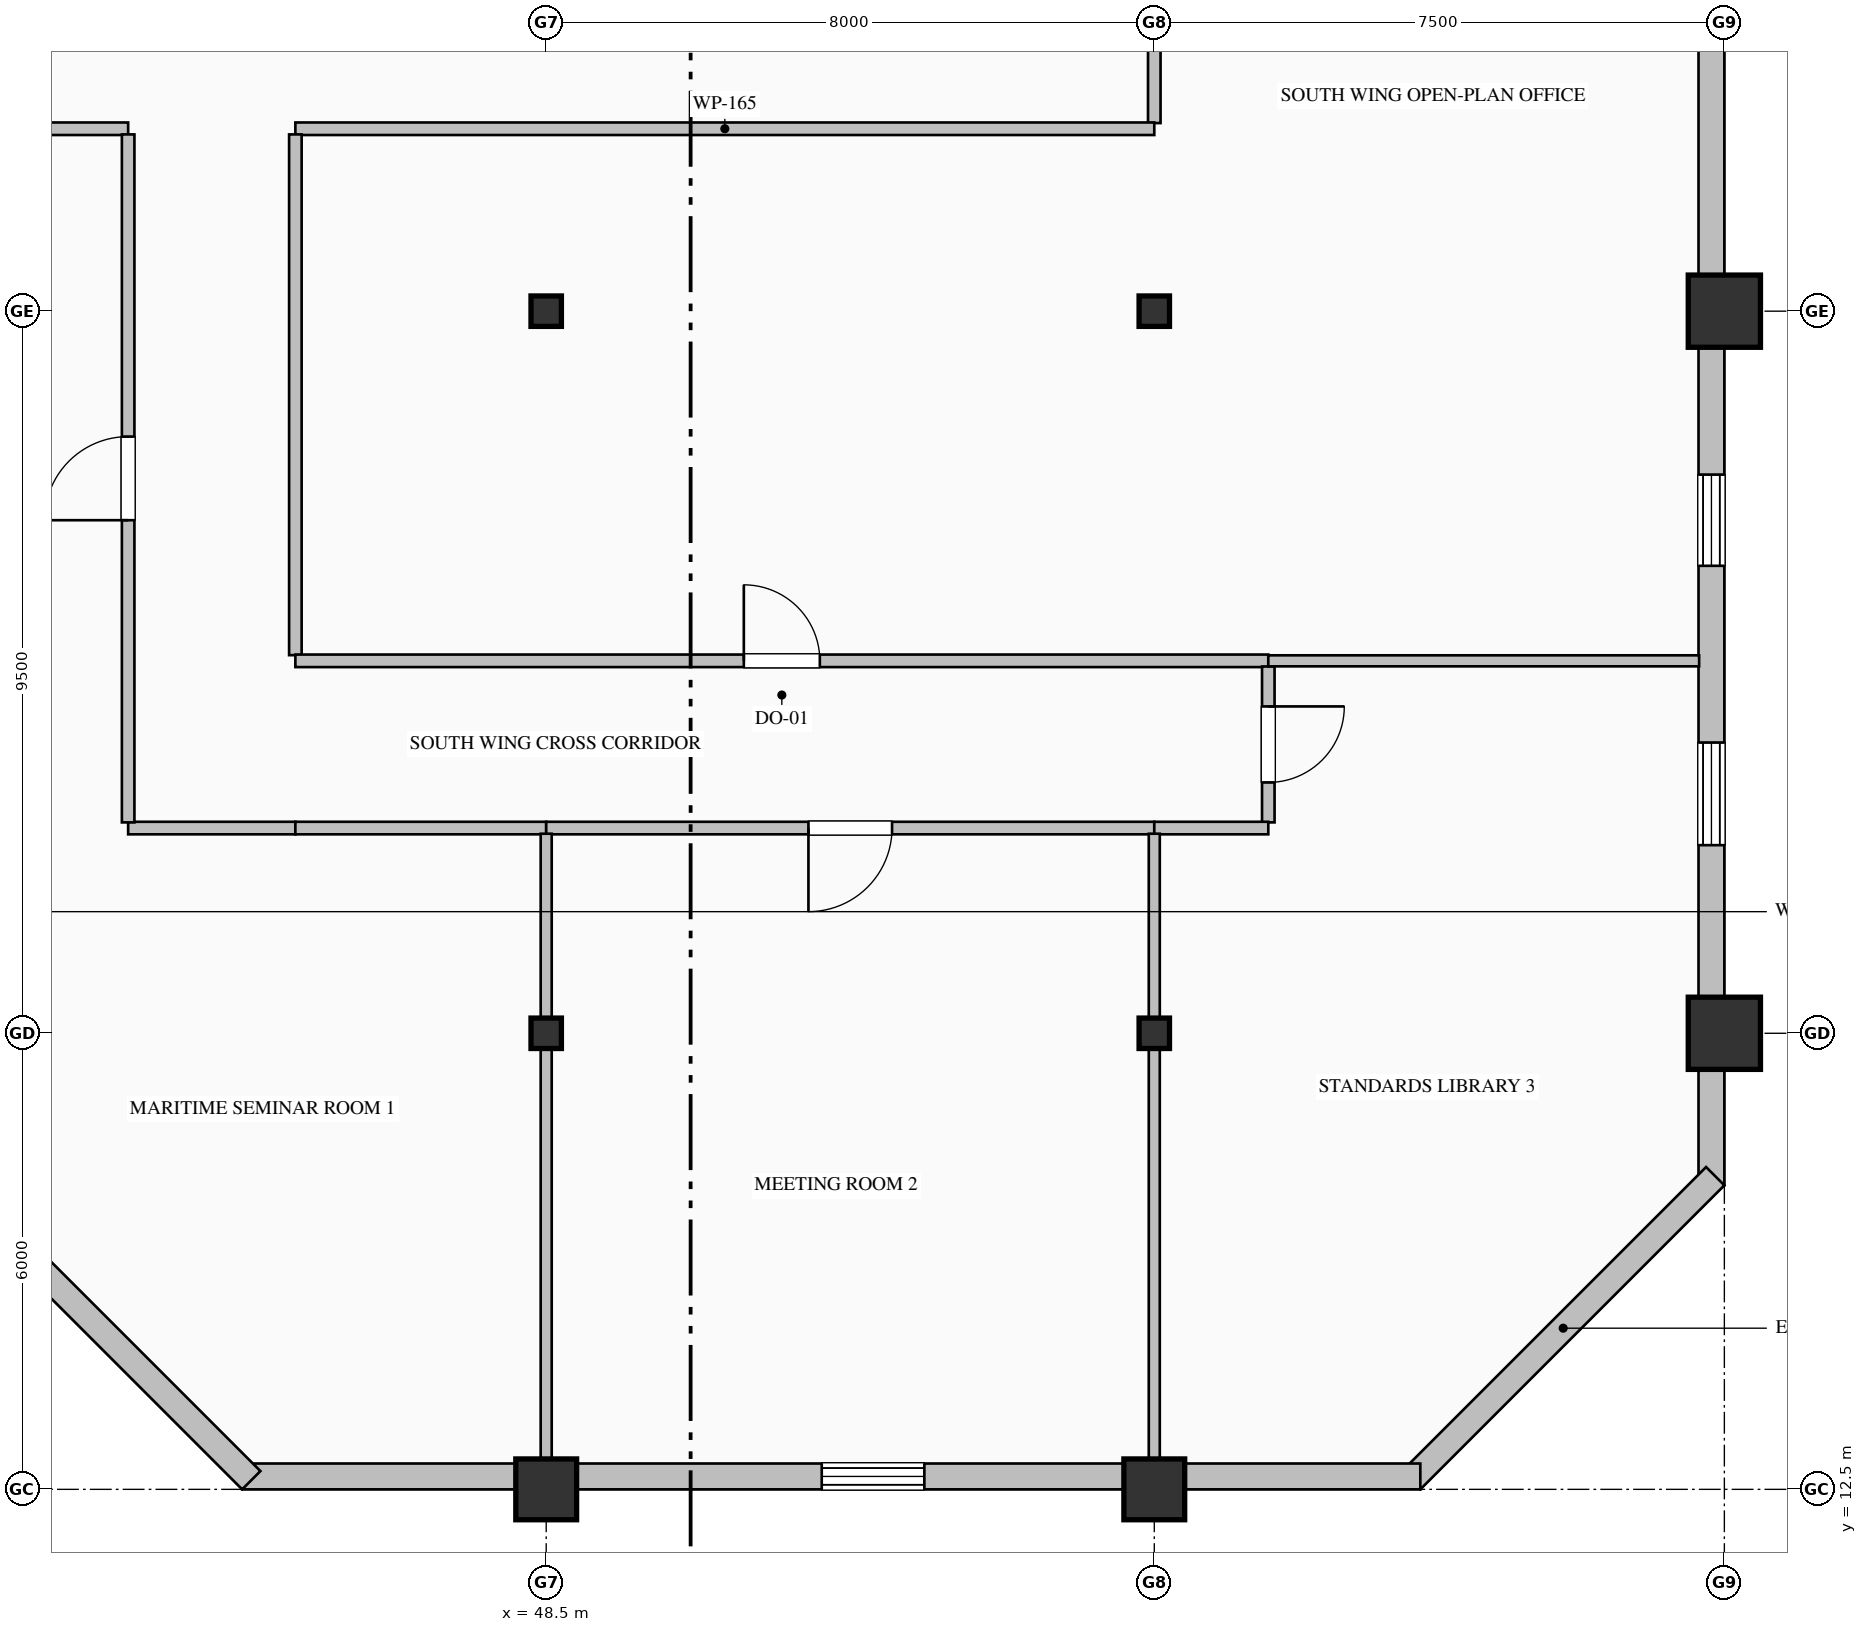
"""IFC4 building model, lengths in metres.
Left out: names, types, materials, properties, quantities, classifications, styles, units other than length and angle.
Written with IfcOpenShell. Run it as: python <this file> out.ifc"""

import sys

from ifc_helpers import new_model, si_unit, direction, frame, frame_2d, origin, origin_2d, place, context, subcontext, project, spatial, rectangle, hollow_rectangle, i_section, extrude, element, fill, save


model = new_model("IFC4")
c1 = context("Model", 3, precision=1e-05, world=origin(), true_north=direction((0.0, 1.0)))
c2 = subcontext(c1, "Body", "Model", "MODEL_VIEW")
j1 = project(units=[si_unit("LENGTHUNIT", "METRE"), si_unit("PLANEANGLEUNIT", "RADIAN")], contexts=[c1])
p1 = place(None, origin())
s1 = spatial("IfcSite", under=j1, at=p1, CompositionType="ELEMENT")
p2 = place(p1, origin())
s2 = spatial("IfcBuilding", under=s1, at=p2, CompositionType="ELEMENT")
p3 = place(p2, frame((0.0, 0.0, 217.8)))
s3 = spatial("IfcBuildingStorey", under=s2, at=p3, CompositionType="ELEMENT", Elevation=217.8)
p4 = place(p3, frame((48.5, 12.5, 0.0), z_axis=(0.0, 0.0, 1.0), x_axis=(1.0, 0.0, 0.0)))
e1 = element("IfcColumn", 1, at=p4, inside=s3, PredefinedType="COLUMN", context=c2, shape_type="SweptSolid", body=[
    extrude(hollow_rectangle(XDim=0.8, YDim=0.8, WallThickness=0.032, at=origin_2d()), origin(), (0.0, 0.0, 1.0), 4.0),
])
for number, where, z_axis, x_axis in (
    (2, (48.5, 18.5, 0.0), (0.0, 0.0, 1.0), (1.0, 0.0, 0.0)),
    (3, (48.5, 28.0, 0.0), (0.0, 0.0, 1.0), (1.0, 0.0, 0.0)),
):
    element("IfcColumn", number, at=place(p3, frame(where, z_axis=z_axis, x_axis=x_axis)), inside=s3, PredefinedType="COLUMN", context=c2, shape_type="SweptSolid", body=[
        extrude(i_section(OverallWidth=0.4, OverallDepth=0.4, WebThickness=0.013, FlangeThickness=0.021, FilletRadius=0.022, at=origin_2d()), origin(), (0.0, 0.0, 1.0), 4.0),
    ])
p5 = place(p3, frame((56.5, 12.5, 0.0), z_axis=(0.0, 0.0, 1.0), x_axis=(1.0, 0.0, 0.0)))
e4 = element("IfcColumn", 4, at=p5, inside=s3, PredefinedType="COLUMN", context=c2, shape_type="SweptSolid", body=[
    extrude(hollow_rectangle(XDim=0.8, YDim=0.8, WallThickness=0.032, at=origin_2d()), origin(), (0.0, 0.0, 1.0), 4.0),
])
for number, where, z_axis, x_axis in (
    (5, (56.5, 18.5, 0.0), (0.0, 0.0, 1.0), (1.0, 0.0, 0.0)),
    (6, (56.5, 28.0, 0.0), (0.0, 0.0, 1.0), (1.0, 0.0, 0.0)),
):
    element("IfcColumn", number, at=place(p3, frame(where, z_axis=z_axis, x_axis=x_axis)), inside=s3, PredefinedType="COLUMN", context=c2, shape_type="SweptSolid", body=[
        extrude(i_section(OverallWidth=0.4, OverallDepth=0.4, WebThickness=0.013, FlangeThickness=0.021, FilletRadius=0.022, at=origin_2d()), origin(), (0.0, 0.0, 1.0), 4.0),
    ])
for number, where, z_axis, x_axis in (
    (7, (64.0, 18.5, 0.0), (0.0, 0.0, 1.0), (1.0, 0.0, 0.0)),
    (8, (64.0, 28.0, 0.0), (0.0, 0.0, 1.0), (1.0, 0.0, 0.0)),
):
    element("IfcColumn", number, at=place(p3, frame(where, z_axis=z_axis, x_axis=x_axis)), inside=s3, PredefinedType="COLUMN", context=c2, shape_type="SweptSolid", body=[
        extrude(hollow_rectangle(XDim=0.95, YDim=0.95, WallThickness=0.036, at=origin_2d()), origin(), (0.0, 0.0, 1.0), 4.0),
    ])
p6 = place(p3, frame((63.83, 36.05, 0.0), z_axis=(0.0, 0.0, 1.0), x_axis=(0.0, -1.0, 0.0)))
e9 = element("IfcWall", 9, at=p6, inside=s3, PredefinedType="SOLIDWALL", context=c2, shape_type="SweptSolid", body=[
    extrude(rectangle(XDim=19.55, YDim=0.34, at=frame_2d((9.775, 0.0))), origin(), (0.0, 0.0, 1.0), 3.325),
])
p7 = place(p6, frame((2.925, 0.0, 0.9)))
e10 = element("IfcOpeningElement", 10, at=p7, cuts=e9, PredefinedType="OPENING", context=c2, shape_type="SweptSolid", body=[
    extrude(rectangle(XDim=1.35, YDim=1.85, at=frame_2d((0.675, 0.925))), frame((0.0, 0.18, 0.0), z_axis=(0.0, -1.0, 0.0), x_axis=(1.0, 0.0, 0.0)), (0.0, 0.0, 1.0), 0.36),
])
p8 = place(p6, frame((10.2, 0.0, 0.9)))
e11 = element("IfcOpeningElement", 11, at=p8, cuts=e9, PredefinedType="OPENING", context=c2, shape_type="SweptSolid", body=[
    extrude(rectangle(XDim=1.2, YDim=1.85, at=frame_2d((0.6, 0.925))), frame((0.0, 0.18, 0.0), z_axis=(0.0, -1.0, 0.0), x_axis=(1.0, 0.0, 0.0)), (0.0, 0.0, 1.0), 0.36),
])
p9 = place(p6, frame((13.725, 0.0, 0.9)))
e12 = element("IfcOpeningElement", 12, at=p9, cuts=e9, PredefinedType="OPENING", context=c2, shape_type="SweptSolid", body=[
    extrude(rectangle(XDim=1.35, YDim=1.85, at=frame_2d((0.675, 0.925))), frame((0.0, 0.18, 0.0), z_axis=(0.0, -1.0, 0.0), x_axis=(1.0, 0.0, 0.0)), (0.0, 0.0, 1.0), 0.36),
])
p10 = place(p3, frame((63.88, 16.62, 0.0), z_axis=(0.0, 0.0, 1.0), x_axis=(-0.707106781187, -0.707106781187, 0.0)))
e13 = element("IfcWall", 13, at=p10, inside=s3, PredefinedType="SOLIDWALL", context=c2, shape_type="SweptSolid", body=[
    extrude(rectangle(XDim=5.657, YDim=0.34, at=frame_2d((2.828, 0.0))), origin(), (0.0, 0.0, 1.0), 3.775),
])
p11 = place(p3, frame((60.0, 12.67, 0.0), z_axis=(0.0, 0.0, 1.0), x_axis=(-1.0, 0.0, 0.0)))
e14 = element("IfcWall", 14, at=p11, inside=s3, PredefinedType="SOLIDWALL", context=c2, shape_type="SweptSolid", body=[
    extrude(rectangle(XDim=15.5, YDim=0.34, at=frame_2d((7.75, 0.0))), origin(), (0.0, 0.0, 1.0), 3.325),
])
p12 = place(p11, frame((6.525, 0.0, 0.9)))
e15 = element("IfcOpeningElement", 15, at=p12, cuts=e14, PredefinedType="OPENING", context=c2, shape_type="SweptSolid", body=[
    extrude(rectangle(XDim=1.35, YDim=1.85, at=frame_2d((0.675, 0.925))), frame((0.0, 0.18, 0.0), z_axis=(0.0, -1.0, 0.0), x_axis=(1.0, 0.0, 0.0)), (0.0, 0.0, 1.0), 0.36),
])
p13 = place(p3, frame((44.62, 12.62, 0.0), z_axis=(0.0, 0.0, 1.0), x_axis=(-0.707106781187, 0.707106781187, 0.0)))
e16 = element("IfcWall", 16, at=p13, inside=s3, PredefinedType="SOLIDWALL", context=c2, shape_type="SweptSolid", body=[
    extrude(rectangle(XDim=5.657, YDim=0.34, at=frame_2d((2.828, 0.0))), origin(), (0.0, 0.0, 1.0), 3.775),
])
p14 = place(p3, frame((56.5, 36.0, 0.0), z_axis=(0.0, 0.0, 1.0), x_axis=(0.0, -1.0, 0.0)))
e17 = element("IfcWall", 17, at=p14, inside=s3, PredefinedType="PARTITIONING", context=c2, shape_type="SweptSolid", body=[
    extrude(rectangle(XDim=5.525, YDim=0.165, at=frame_2d((2.763, 0.0))), origin(), (0.0, 0.0, 1.0), 3.179),
])
p15 = place(p3, frame((56.5, 30.4, 0.0), z_axis=(0.0, 0.0, 1.0), x_axis=(-1.0, 0.0, 0.0)))
e18 = element("IfcWall", 18, at=p15, inside=s3, PredefinedType="PARTITIONING", context=c2, shape_type="SweptSolid", body=[
    extrude(rectangle(XDim=11.3, YDim=0.165, at=frame_2d((5.65, 0.0))), origin(), (0.0, 0.0, 1.0), 3.775),
])
p16 = place(p3, frame((43.0, 30.4, 0.0), z_axis=(0.0, 0.0, 1.0), x_axis=(-1.0, 0.0, 0.0)))
e19 = element("IfcWall", 19, at=p16, inside=s3, PredefinedType="PARTITIONING", context=c2, shape_type="SweptSolid", body=[
    extrude(rectangle(XDim=2.5, YDim=0.165, at=frame_2d((1.25, 0.0))), origin(), (0.0, 0.0, 1.0), 3.775),
])
p17 = place(p3, frame((45.2, 30.325, 0.0), z_axis=(0.0, 0.0, 1.0), x_axis=(0.0, -1.0, 0.0)))
e20 = element("IfcWall", 20, at=p17, inside=s3, PredefinedType="PARTITIONING", context=c2, shape_type="SweptSolid", body=[
    extrude(rectangle(XDim=6.851, YDim=0.165, at=frame_2d((3.425, 0.0))), origin(), (0.0, 0.0, 1.0), 3.775),
])
p18 = place(p3, frame((45.2, 21.2, 0.0), z_axis=(0.0, 0.0, 1.0), x_axis=(-1.0, 0.0, 0.0)))
e21 = element("IfcWall", 21, at=p18, inside=s3, PredefinedType="PARTITIONING", context=c2, shape_type="SweptSolid", body=[
    extrude(rectangle(XDim=2.2, YDim=0.165, at=frame_2d((1.1, 0.0))), origin(), (0.0, 0.0, 1.0), 3.775),
])
p19 = place(p3, frame((43.0, 21.274, 0.0), z_axis=(0.0, 0.0, 1.0), x_axis=(0.0, 1.0, 0.0)))
e22 = element("IfcWall", 22, at=p19, inside=s3, PredefinedType="PARTITIONING", context=c2, shape_type="SweptSolid", body=[
    extrude(rectangle(XDim=9.051, YDim=0.165, at=frame_2d((4.525, 0.0))), origin(), (0.0, 0.0, 1.0), 3.775),
])
p20 = place(p19, frame((3.976, 0.0, 0.0)))
e23 = element("IfcOpeningElement", 23, at=p20, cuts=e22, PredefinedType="OPENING", context=c2, shape_type="SweptSolid", body=[
    extrude(rectangle(XDim=1.1, YDim=2.2, at=frame_2d((0.55, 1.1))), frame((0.0, 0.093, 0.0), z_axis=(0.0, -1.0, 0.0), x_axis=(1.0, 0.0, 0.0)), (0.0, 0.0, 1.0), 0.185),
])
p21 = place(p3, frame((45.2, 23.4, 0.0), z_axis=(0.0, 0.0, 1.0), x_axis=(1.0, 0.0, 0.0)))
e24 = element("IfcWall", 24, at=p21, inside=s3, PredefinedType="PARTITIONING", context=c2, shape_type="SweptSolid", body=[
    extrude(rectangle(XDim=12.8, YDim=0.165, at=frame_2d((6.4, 0.0))), origin(), (0.0, 0.0, 1.0), 3.467),
])
p22 = place(p21, frame((5.9, 0.0, 0.0)))
e25 = element("IfcOpeningElement", 25, at=p22, cuts=e24, PredefinedType="OPENING", context=c2, shape_type="SweptSolid", body=[
    extrude(rectangle(XDim=1.0, YDim=2.15, at=frame_2d((0.5, 1.075))), frame((0.0, 0.093, 0.0), z_axis=(0.0, -1.0, 0.0), x_axis=(1.0, 0.0, 0.0)), (0.0, 0.0, 1.0), 0.185),
])
p23 = place(p3, frame((48.5, 21.2, 0.0), z_axis=(0.0, 0.0, 1.0), x_axis=(-1.0, 0.0, 0.0)))
e26 = element("IfcWall", 26, at=p23, inside=s3, PredefinedType="PARTITIONING", context=c2, shape_type="SweptSolid", body=[
    extrude(rectangle(XDim=3.3, YDim=0.165, at=frame_2d((1.65, 0.0))), origin(), (0.0, 0.0, 1.0), 3.775),
])
p24 = place(p3, frame((56.5, 21.2, 0.0), z_axis=(0.0, 0.0, 1.0), x_axis=(-1.0, 0.0, 0.0)))
e27 = element("IfcWall", 27, at=p24, inside=s3, PredefinedType="PARTITIONING", context=c2, shape_type="SweptSolid", body=[
    extrude(rectangle(XDim=8.0, YDim=0.165, at=frame_2d((4.0, 0.0))), origin(), (0.0, 0.0, 1.0), 3.775),
])
p25 = place(p24, frame((3.45, 0.0, 0.0)))
e28 = element("IfcOpeningElement", 28, at=p25, cuts=e27, PredefinedType="OPENING", context=c2, shape_type="SweptSolid", body=[
    extrude(rectangle(XDim=1.1, YDim=2.2, at=frame_2d((0.55, 1.1))), frame((0.0, 0.093, 0.0), z_axis=(0.0, -1.0, 0.0), x_axis=(1.0, 0.0, 0.0)), (0.0, 0.0, 1.0), 0.185),
])
p26 = place(p3, frame((58.0, 23.325, 0.0), z_axis=(0.0, 0.0, 1.0), x_axis=(0.0, -1.0, 0.0)))
e29 = element("IfcWall", 29, at=p26, inside=s3, PredefinedType="PARTITIONING", context=c2, shape_type="SweptSolid", body=[
    extrude(rectangle(XDim=2.051, YDim=0.165, at=frame_2d((1.025, 0.0))), origin(), (0.0, 0.0, 1.0), 3.775),
])
p27 = place(p26, frame((0.525, 0.0, 0.0)))
e30 = element("IfcOpeningElement", 30, at=p27, cuts=e29, PredefinedType="OPENING", context=c2, shape_type="SweptSolid", body=[
    extrude(rectangle(XDim=1.0, YDim=2.15, at=frame_2d((0.5, 1.075))), frame((0.0, 0.093, 0.0), z_axis=(0.0, -1.0, 0.0), x_axis=(1.0, 0.0, 0.0)), (0.0, 0.0, 1.0), 0.185),
])
p28 = place(p3, frame((58.0, 21.2, 0.0), z_axis=(0.0, 0.0, 1.0), x_axis=(-1.0, 0.0, 0.0)))
e31 = element("IfcWall", 31, at=p28, inside=s3, PredefinedType="PARTITIONING", context=c2, shape_type="SweptSolid", body=[
    extrude(rectangle(XDim=1.5, YDim=0.165, at=frame_2d((0.75, 0.0))), origin(), (0.0, 0.0, 1.0), 3.775),
])
p29 = place(p3, frame((63.668, 23.4, 0.0), z_axis=(0.0, 0.0, 1.0), x_axis=(-1.0, 0.0, 0.0)))
e32 = element("IfcWall", 32, at=p29, inside=s3, PredefinedType="PARTITIONING", context=c2, shape_type="SweptSolid", body=[
    extrude(rectangle(XDim=5.668, YDim=0.145, at=frame_2d((2.834, 0.0))), origin(), (0.0, 0.0, 1.0), 3.775),
])
for number, where, z_axis, x_axis in (
    (33, (48.5, 21.125, 0.0), (0.0, 0.0, 1.0), (0.0, -1.0, 0.0)),
    (34, (56.5, 21.125, 0.0), (0.0, 0.0, 1.0), (0.0, -1.0, 0.0)),
):
    element("IfcWall", number, at=place(p3, frame(where, z_axis=z_axis, x_axis=x_axis)), inside=s3, PredefinedType="PARTITIONING", context=c2, shape_type="SweptSolid", body=[
        extrude(rectangle(XDim=8.293, YDim=0.145, at=frame_2d((4.147, 0.0))), origin(), (0.0, 0.0, 1.0), 2.967),
    ])
p30 = place(p8, origin())
e35 = element("IfcWindow", 35, at=p30, inside=s3, PartitioningType="DOUBLE_PANEL_VERTICAL", PredefinedType="WINDOW", context=c2, shape_type="SweptSolid", body=[
    extrude(rectangle(XDim=1.2, YDim=1.85, at=frame_2d((0.6, 0.925))), frame((0.0, 0.15, 0.0), z_axis=(0.0, -1.0, 0.0), x_axis=(1.0, 0.0, 0.0)), (0.0, 0.0, 1.0), 0.06),
])
fill(e11, e35)
p31 = place(p9, origin())
e36 = element("IfcWindow", 36, at=p31, inside=s3, PartitioningType="DOUBLE_PANEL_VERTICAL", PredefinedType="WINDOW", context=c2, shape_type="SweptSolid", body=[
    extrude(rectangle(XDim=1.35, YDim=1.85, at=frame_2d((0.675, 0.925))), frame((0.0, 0.15, 0.0), z_axis=(0.0, -1.0, 0.0), x_axis=(1.0, 0.0, 0.0)), (0.0, 0.0, 1.0), 0.06),
])
fill(e12, e36)
p32 = place(p12, origin())
e37 = element("IfcWindow", 37, at=p32, inside=s3, PartitioningType="DOUBLE_PANEL_VERTICAL", PredefinedType="WINDOW", context=c2, shape_type="SweptSolid", body=[
    extrude(rectangle(XDim=1.35, YDim=1.85, at=frame_2d((0.675, 0.925))), frame((0.0, 0.15, 0.0), z_axis=(0.0, -1.0, 0.0), x_axis=(1.0, 0.0, 0.0)), (0.0, 0.0, 1.0), 0.06),
])
fill(e15, e37)
p33 = place(p22, origin())
e38 = element("IfcDoor", 38, at=p33, inside=s3, OperationType="SINGLE_SWING_LEFT", PredefinedType="DOOR", context=c2, shape_type="SweptSolid", body=[
    extrude(rectangle(XDim=1.0, YDim=2.15, at=frame_2d((0.5, 1.075))), frame((0.0, 0.025, 0.0), z_axis=(0.0, -1.0, 0.0), x_axis=(1.0, 0.0, 0.0)), (0.0, 0.0, 1.0), 0.05),
])
fill(e25, e38)
p34 = place(p20, origin())
e39 = element("IfcDoor", 39, at=p34, inside=s3, OperationType="SINGLE_SWING_LEFT", PredefinedType="DOOR", context=c2, shape_type="SweptSolid", body=[
    extrude(rectangle(XDim=1.1, YDim=2.2, at=frame_2d((0.55, 1.1))), frame((0.0, 0.025, 0.0), z_axis=(0.0, -1.0, 0.0), x_axis=(1.0, 0.0, 0.0)), (0.0, 0.0, 1.0), 0.05),
])
fill(e23, e39)
p35 = place(p25, origin())
e40 = element("IfcDoor", 40, at=p35, inside=s3, OperationType="SINGLE_SWING_RIGHT", PredefinedType="DOOR", context=c2, shape_type="SweptSolid", body=[
    extrude(rectangle(XDim=1.1, YDim=2.2, at=frame_2d((0.55, 1.1))), frame((0.0, 0.025, 0.0), z_axis=(0.0, -1.0, 0.0), x_axis=(1.0, 0.0, 0.0)), (0.0, 0.0, 1.0), 0.05),
])
fill(e28, e40)
p36 = place(p27, origin())
e41 = element("IfcDoor", 41, at=p36, inside=s3, OperationType="SINGLE_SWING_LEFT", PredefinedType="DOOR", context=c2, shape_type="SweptSolid", body=[
    extrude(rectangle(XDim=1.0, YDim=2.15, at=frame_2d((0.5, 1.075))), frame((0.0, 0.025, 0.0), z_axis=(0.0, -1.0, 0.0), x_axis=(1.0, 0.0, 0.0)), (0.0, 0.0, 1.0), 0.05),
])
fill(e30, e41)
save(model, sys.argv[1])
